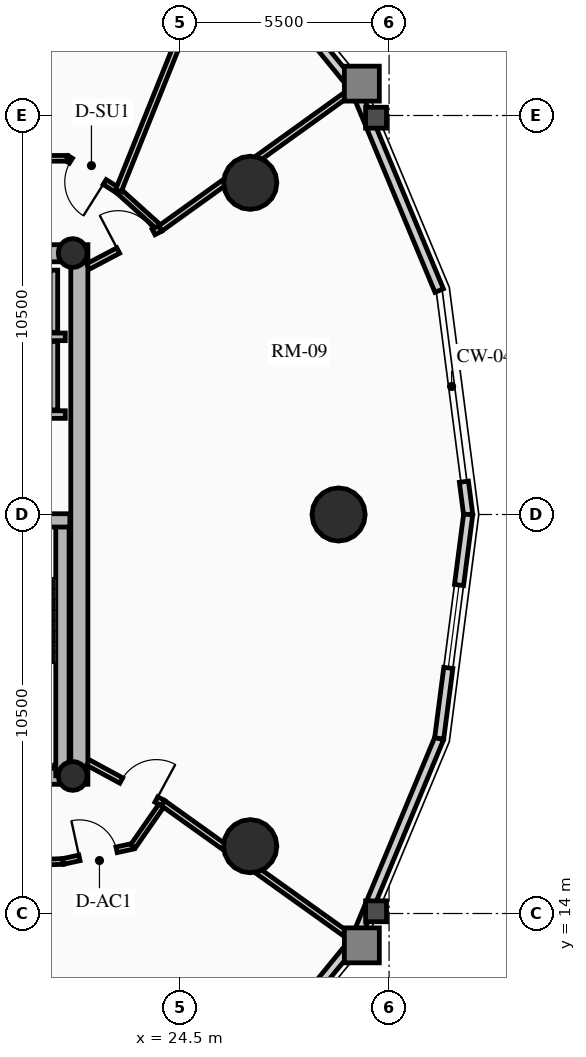
"""IFC4 building model, lengths in metres.
Left out: names, types, materials, properties, quantities, classifications, styles, units other than length and angle.
Written with IfcOpenShell. Run it as: python <this file> out.ifc"""

import sys

from ifc_helpers import new_model, si_unit, direction, frame, frame_2d, origin, origin_2d, place, context, subcontext, project, spatial, rectangle, circle, hollow_circle, extrude, source, transform, mapped, element, fill, save


model = new_model("IFC4")
c1 = context("Model", 3, precision=1e-05, world=origin(), true_north=direction((0.0, 1.0)))
c2 = subcontext(c1, "Body", "Model", "MODEL_VIEW")
j1 = project(units=[si_unit("LENGTHUNIT", "METRE"), si_unit("PLANEANGLEUNIT", "RADIAN")], contexts=[c1])
p1 = place(None, origin())
s1 = spatial("IfcSite", under=j1, at=p1, CompositionType="ELEMENT")
p2 = place(p1, origin())
s2 = spatial("IfcBuilding", under=s1, at=p2, CompositionType="ELEMENT")
p3 = place(p2, frame((0.0, 0.0, 119.62)))
s3 = spatial("IfcBuildingStorey", under=s2, at=p3, CompositionType="ELEMENT", Elevation=119.62)
p4 = place(p3, frame((21.85, 17.4, 0.0), z_axis=(0.0, 0.0, 1.0), x_axis=(0.0, 1.0, 0.0)))
e1 = element("IfcWall", 1, at=p4, inside=s3, PredefinedType="SHEAR", context=c2, shape_type="SweptSolid", body=[
    extrude(rectangle(XDim=14.2, YDim=0.45, at=frame_2d((7.1, 0.0))), origin(), (0.0, 0.0, 1.0), 2.91),
])
p5 = place(p3, frame((11.15, 17.625, 0.0), z_axis=(0.0, 0.0, 1.0), x_axis=(1.0, 0.0, 0.0)))
e2 = element("IfcWall", 2, at=p5, inside=s3, PredefinedType="SHEAR", context=c2, shape_type="SweptSolid", body=[
    extrude(rectangle(XDim=10.7, YDim=0.45, at=frame_2d((5.35, 0.0))), origin(), (0.0, 0.0, 1.0), 2.91),
])
m1 = source(origin(), c2, "Body", "SweptSolid", [
    extrude(rectangle(XDim=1.5, YDim=2.02, at=frame_2d((0.75, 1.01))), frame((0.0, 0.235, 0.0), z_axis=(0.0, -1.0, 0.0), x_axis=(1.0, 0.0, 0.0)), (0.0, 0.0, 1.0), 0.47),
])
p6 = place(p5, frame((5.45, 0.0, 0.0)))
e3 = element("IfcOpeningElement", 3, at=p6, cuts=e2, PredefinedType="OPENING", context=c2, shape_type="MappedRepresentation", body=[
    mapped(m1, transform((0.0, 0.0, 0.0), x_axis=(1.0, 0.0, 0.0), y_axis=(0.0, 1.0, 0.0), z_axis=(0.0, 0.0, 1.0), scale=1.0)),
])
p7 = place(p3, frame((11.15, 31.375, 0.0), z_axis=(0.0, 0.0, 1.0), x_axis=(1.0, 0.0, 0.0)))
e4 = element("IfcWall", 4, at=p7, inside=s3, PredefinedType="SHEAR", context=c2, shape_type="SweptSolid", body=[
    extrude(rectangle(XDim=10.7, YDim=0.45, at=frame_2d((5.35, 0.0))), origin(), (0.0, 0.0, 1.0), 2.91),
])
p8 = place(p7, frame((4.6, 0.0, 0.0)))
e5 = element("IfcOpeningElement", 5, at=p8, cuts=e4, PredefinedType="OPENING", context=c2, shape_type="MappedRepresentation", body=[
    mapped(m1, transform((0.0, 0.0, 0.0), x_axis=(1.0, 0.0, 0.0), y_axis=(0.0, 1.0, 0.0), z_axis=(0.0, 0.0, 1.0), scale=1.0)),
])
p9 = place(p3, frame((21.405, 17.625, 0.0), z_axis=(0.0, 0.0, 1.0), x_axis=(0.0, 1.0, 0.0)))
e6 = element("IfcWall", 6, at=p9, inside=s3, PredefinedType="SHEAR", context=c2, shape_type="SweptSolid", body=[
    extrude(rectangle(XDim=6.72, YDim=0.35, at=frame_2d((3.36, 0.0))), origin(), (0.0, 0.0, 1.0), 2.91),
])
p10 = place(p3, frame((18.315, 24.345, 0.0), z_axis=(0.0, 0.0, 1.0), x_axis=(1.0, 0.0, 0.0)))
e7 = element("IfcWall", 7, at=p10, inside=s3, PredefinedType="SHEAR", context=c2, shape_type="SweptSolid", body=[
    extrude(rectangle(XDim=3.285, YDim=0.35, at=frame_2d((1.643, 0.0))), origin(), (0.0, 0.0, 1.0), 2.91),
])
for number, where, z_axis, x_axis in (
    (8, (21.675, 17.62, 0.0), (0.0, 0.0, 1.0), (1.0, 0.0, 0.0)),
    (9, (21.675, 31.38, 0.0), (0.0, 0.0, 1.0), (1.0, 0.0, 0.0)),
):
    element("IfcColumn", number, at=place(p3, frame(where, z_axis=z_axis, x_axis=x_axis)), inside=s3, PredefinedType="COLUMN", context=c2, shape_type="SweptSolid", body=[
        extrude(hollow_circle(Radius=0.38, WallThickness=0.032, at=origin_2d()), origin(), (0.0, 0.0, 1.0), 2.91),
    ])
for number, where, z_axis, x_axis in (
    (10, (28.672, 24.5, 0.0), (0.0, 0.0, 1.0), (1.0, 0.0, 0.0)),
    (11, (26.347, 33.229, 0.0), (0.0, 0.0, 1.0), (1.0, 0.0, 0.0)),
    (12, (26.347, 15.771, 0.0), (0.0, 0.0, 1.0), (1.0, 0.0, 0.0)),
):
    element("IfcColumn", number, at=place(p3, frame(where, z_axis=z_axis, x_axis=x_axis)), inside=s3, PredefinedType="USERDEFINED", context=c2, shape_type="SweptSolid", body=[
        extrude(circle(Radius=0.7, at=origin_2d()), origin(), (0.0, 0.0, 1.0), 2.91),
    ])
p11 = place(p3, frame((31.969, 25.363, 0.0), z_axis=(0.0, 0.0, 1.0), x_axis=(0.128523364007, -0.991706481225, 0.0)))
e13 = element("IfcWall", 13, at=p11, inside=s3, PredefinedType="SOLIDWALL", context=c2, shape_type="SweptSolid", body=[
    extrude(rectangle(XDim=0.87, YDim=0.24, at=frame_2d((0.435, 0.0))), origin(), (0.0, 0.0, 1.0), 2.655),
])
p12 = place(p3, frame((29.105, 35.709, 0.0), z_axis=(0.0, 0.0, 1.0), x_axis=(0.384344417632, -0.923189779317, 0.0)))
e14 = element("IfcWall", 14, at=p12, inside=s3, PredefinedType="SOLIDWALL", context=c2, shape_type="SweptSolid", body=[
    extrude(rectangle(XDim=5.758, YDim=0.24, at=frame_2d((2.879, 0.0))), origin(), (0.0, 0.0, 1.0), 2.179),
])
p13 = place(p3, frame((25.658, 39.928, 0.0), z_axis=(0.0, 0.0, 1.0), x_axis=(0.632700781152, -0.77439635945, 0.0)))
e15 = element("IfcWall", 15, at=p13, inside=s3, PredefinedType="SOLIDWALL", context=c2, shape_type="SweptSolid", body=[
    extrude(rectangle(XDim=5.448, YDim=0.24, at=frame_2d((2.724, 0.0))), origin(), (0.0, 0.0, 1.0), 2.179),
])
m2 = source(origin(), c2, "Body", "SweptSolid", [
    extrude(rectangle(XDim=1.9, YDim=1.35, at=frame_2d((0.95, 0.675))), frame((0.0, 0.13, 0.0), z_axis=(0.0, -1.0, 0.0), x_axis=(1.0, 0.0, 0.0)), (0.0, 0.0, 1.0), 0.26),
])
p14 = place(p13, frame((1.774, 0.0, 0.65)))
e16 = element("IfcOpeningElement", 16, at=p14, cuts=e15, PredefinedType="OPENING", context=c2, shape_type="MappedRepresentation", body=[
    mapped(m2, transform((0.0, 0.0, 0.0), x_axis=(1.0, 0.0, 0.0), y_axis=(0.0, 1.0, 0.0), z_axis=(0.0, 0.0, 1.0), scale=1.0)),
])
p15 = place(p3, frame((29.105, 13.291, 0.0), z_axis=(0.0, 0.0, 1.0), x_axis=(-0.632700781152, -0.77439635945, 0.0)))
e17 = element("IfcWall", 17, at=p15, inside=s3, PredefinedType="SOLIDWALL", context=c2, shape_type="SweptSolid", body=[
    extrude(rectangle(XDim=5.448, YDim=0.24, at=frame_2d((2.724, 0.0))), origin(), (0.0, 0.0, 1.0), 2.179),
])
p16 = place(p15, frame((1.774, 0.0, 0.65)))
e18 = element("IfcOpeningElement", 18, at=p16, cuts=e17, PredefinedType="OPENING", context=c2, shape_type="MappedRepresentation", body=[
    mapped(m2, transform((0.0, 0.0, 0.0), x_axis=(1.0, 0.0, 0.0), y_axis=(0.0, 1.0, 0.0), z_axis=(0.0, 0.0, 1.0), scale=1.0)),
])
p17 = place(p3, frame((31.318, 18.607, 0.0), z_axis=(0.0, 0.0, 1.0), x_axis=(-0.384344417632, -0.923189779317, 0.0)))
e19 = element("IfcWall", 19, at=p17, inside=s3, PredefinedType="SOLIDWALL", context=c2, shape_type="SweptSolid", body=[
    extrude(rectangle(XDim=5.758, YDim=0.24, at=frame_2d((2.879, 0.0))), origin(), (0.0, 0.0, 1.0), 2.179),
])
p18 = place(p3, frame((32.081, 24.5, 0.0), z_axis=(0.0, 0.0, 1.0), x_axis=(-0.128351991996, -0.991728675672, 0.0)))
e20 = element("IfcWall", 20, at=p18, inside=s3, PredefinedType="SOLIDWALL", context=c2, shape_type="SweptSolid", body=[
    extrude(rectangle(XDim=5.942, YDim=0.24, at=frame_2d((2.971, 0.0))), origin(), (0.0, 0.0, 1.0), 2.179),
])
m3 = source(origin(), c2, "Body", "SweptSolid", [
    extrude(rectangle(XDim=2.2, YDim=1.35, at=frame_2d((1.1, 0.675))), frame((0.0, 0.13, 0.0), z_axis=(0.0, -1.0, 0.0), x_axis=(1.0, 0.0, 0.0)), (0.0, 0.0, 1.0), 0.26),
])
p19 = place(p18, frame((1.871, 0.0, 0.65)))
e21 = element("IfcOpeningElement", 21, at=p19, cuts=e20, PredefinedType="OPENING", context=c2, shape_type="MappedRepresentation", body=[
    mapped(m3, transform((0.0, 0.0, 0.0), x_axis=(1.0, 0.0, 0.0), y_axis=(0.0, 1.0, 0.0), z_axis=(0.0, 0.0, 1.0), scale=1.0)),
])
for number, where, z_axis, x_axis in (
    (22, (18.51, 27.13, 0.0), (0.0, 0.0, 1.0), (1.0, 0.0, 0.0)),
    (23, (18.51, 29.175, 0.0), (0.0, 0.0, 1.0), (1.0, 0.0, 0.0)),
):
    element("IfcWall", number, at=place(p3, frame(where, z_axis=z_axis, x_axis=x_axis)), inside=s3, PredefinedType="SHEAR", context=c2, shape_type="SweptSolid", body=[
        extrude(rectangle(XDim=2.97, YDim=0.2, at=frame_2d((1.485, 0.0))), origin(), (0.0, 0.0, 1.0), 2.91),
    ])
p20 = place(p3, frame((21.18, 27.25, 0.0), z_axis=(0.0, 0.0, 1.0), x_axis=(0.0, 1.0, 0.0)))
e24 = element("IfcWall", 24, at=p20, inside=s3, PredefinedType="SHEAR", context=c2, shape_type="SweptSolid", body=[
    extrude(rectangle(XDim=1.805, YDim=0.2, at=frame_2d((0.902, 0.0))), origin(), (0.0, 0.0, 1.0), 2.91),
])
p21 = place(p3, frame((21.18, 29.295, 0.0), z_axis=(0.0, 0.0, 1.0), x_axis=(0.0, 1.0, 0.0)))
e25 = element("IfcWall", 25, at=p21, inside=s3, PredefinedType="SHEAR", context=c2, shape_type="SweptSolid", body=[
    extrude(rectangle(XDim=1.635, YDim=0.2, at=frame_2d((0.817, 0.0))), origin(), (0.0, 0.0, 1.0), 2.91),
])
p22 = place(p3, frame((23.98, 32.027, 0.0), z_axis=(0.0, 0.0, 1.0), x_axis=(-0.742353224332, 0.670008724065, 0.0)))
e26 = element("IfcWall", 26, at=p22, inside=s3, PredefinedType="PARTITIONING", context=c2, shape_type="SweptSolid", body=[
    extrude(rectangle(XDim=1.485, YDim=0.15, at=frame_2d((0.742, 0.0))), origin(), (0.0, 0.0, 1.0), 2.225),
])
p23 = place(p3, frame((22.877, 33.022, 0.0), z_axis=(0.0, 0.0, 1.0), x_axis=(-0.845895608855, 0.533348496689, 0.0)))
e27 = element("IfcWall", 27, at=p23, inside=s3, PredefinedType="PARTITIONING", context=c2, shape_type="SweptSolid", body=[
    extrude(rectangle(XDim=1.597, YDim=0.15, at=frame_2d((0.798, 0.0))), origin(), (0.0, 0.0, 1.0), 2.225),
])
m4 = source(origin(), c2, "Body", "SweptSolid", [
    extrude(rectangle(XDim=1.05, YDim=2.015, at=frame_2d((0.525, 1.007))), frame((0.0, 0.085, 0.0), z_axis=(0.0, -1.0, 0.0), x_axis=(1.0, 0.0, 0.0)), (0.0, 0.0, 1.0), 0.17),
])
p24 = place(p23, frame((0.427, 0.0, 0.0)))
e28 = element("IfcOpeningElement", 28, at=p24, cuts=e27, PredefinedType="OPENING", context=c2, shape_type="MappedRepresentation", body=[
    mapped(m4, transform((0.0, 0.0, 0.0), x_axis=(1.0, 0.0, 0.0), y_axis=(0.0, 1.0, 0.0), z_axis=(0.0, 0.0, 1.0), scale=1.0)),
])
p25 = place(p3, frame((21.527, 33.873, 0.0), z_axis=(0.0, 0.0, 1.0), x_axis=(-0.999991838845, -0.004040079574, 0.0)))
e29 = element("IfcWall", 29, at=p25, inside=s3, PredefinedType="PARTITIONING", context=c2, shape_type="SweptSolid", body=[
    extrude(rectangle(XDim=3.384, YDim=0.15, at=frame_2d((1.692, 0.0))), origin(), (0.0, 0.0, 1.0), 2.225),
])
p26 = place(p3, frame((14.781, 15.141, 0.0), z_axis=(0.0, 0.0, 1.0), x_axis=(0.999407918707, 0.034406569513, 0.0)))
e30 = element("IfcWall", 30, at=p26, inside=s3, PredefinedType="PARTITIONING", context=c2, shape_type="SweptSolid", body=[
    extrude(rectangle(XDim=6.642, YDim=0.15, at=frame_2d((3.321, 0.0))), origin(), (0.0, 0.0, 1.0), 2.225),
])
p27 = place(p3, frame((21.419, 15.369, 0.0), z_axis=(0.0, 0.0, 1.0), x_axis=(0.977192701953, 0.212354475464, 0.0)))
e31 = element("IfcWall", 31, at=p27, inside=s3, PredefinedType="PARTITIONING", context=c2, shape_type="SweptSolid", body=[
    extrude(rectangle(XDim=1.888, YDim=0.15, at=frame_2d((0.944, 0.0))), origin(), (0.0, 0.0, 1.0), 2.225),
])
m5 = source(origin(), c2, "Body", "SweptSolid", [
    extrude(rectangle(XDim=1.0, YDim=2.015, at=frame_2d((0.5, 1.007))), frame((0.0, 0.085, 0.0), z_axis=(0.0, -1.0, 0.0), x_axis=(1.0, 0.0, 0.0)), (0.0, 0.0, 1.0), 0.17),
])
p28 = place(p27, frame((0.444, 0.0, 0.0)))
e32 = element("IfcOpeningElement", 32, at=p28, cuts=e31, PredefinedType="OPENING", context=c2, shape_type="MappedRepresentation", body=[
    mapped(m5, transform((0.0, 0.0, 0.0), x_axis=(1.0, 0.0, 0.0), y_axis=(0.0, 1.0, 0.0), z_axis=(0.0, 0.0, 1.0), scale=1.0)),
])
p29 = place(p3, frame((23.263, 15.77, 0.0), z_axis=(0.0, 0.0, 1.0), x_axis=(0.570743456919, 0.821128434768, 0.0)))
e33 = element("IfcWall", 33, at=p29, inside=s3, PredefinedType="PARTITIONING", context=c2, shape_type="SweptSolid", body=[
    extrude(rectangle(XDim=1.382, YDim=0.15, at=frame_2d((0.691, 0.0))), origin(), (0.0, 0.0, 1.0), 2.225),
])
p30 = place(p3, frame((23.98, 32.027, 0.0), z_axis=(0.0, 0.0, 1.0), x_axis=(0.812162479031, 0.58343132214, 0.0)))
e34 = element("IfcWall", 34, at=p30, inside=s3, PredefinedType="PARTITIONING", context=c2, shape_type="SweptSolid", body=[
    extrude(rectangle(XDim=6.291, YDim=0.16, at=frame_2d((3.146, 0.0))), origin(), (0.0, 0.0, 1.0), 2.179),
])
p31 = place(p3, frame((22.877, 33.022, 0.0), z_axis=(0.0, 0.0, 1.0), x_axis=(0.372898022516, 0.927872332168, 0.0)))
e35 = element("IfcWall", 35, at=p31, inside=s3, PredefinedType="PARTITIONING", context=c2, shape_type="SweptSolid", body=[
    extrude(rectangle(XDim=7.426, YDim=0.16, at=frame_2d((3.713, 0.0))), origin(), (0.0, 0.0, 1.0), 2.179),
])
p32 = place(p3, frame((24.052, 16.905, 0.0), z_axis=(0.0, 0.0, 1.0), x_axis=(0.813437670746, -0.581652091727, 0.0)))
e36 = element("IfcWall", 36, at=p32, inside=s3, PredefinedType="PARTITIONING", context=c2, shape_type="SweptSolid", body=[
    extrude(rectangle(XDim=6.192, YDim=0.16, at=frame_2d((3.096, 0.0))), origin(), (0.0, 0.0, 1.0), 2.179),
])
p33 = place(p3, frame((22.075, 31.025, 0.0), z_axis=(0.0, 0.0, 1.0), x_axis=(0.885026466958, 0.465540710125, 0.0)))
e37 = element("IfcWall", 37, at=p33, inside=s3, PredefinedType="PARTITIONING", context=c2, shape_type="SweptSolid", body=[
    extrude(rectangle(XDim=2.152, YDim=0.16, at=frame_2d((1.076, 0.0))), origin(), (0.0, 0.0, 1.0), 2.225),
])
m6 = source(origin(), c2, "Body", "SweptSolid", [
    extrude(rectangle(XDim=1.05, YDim=2.015, at=frame_2d((0.525, 1.007))), frame((0.0, 0.09, 0.0), z_axis=(0.0, -1.0, 0.0), x_axis=(1.0, 0.0, 0.0)), (0.0, 0.0, 1.0), 0.18),
])
p34 = place(p33, frame((0.902, 0.0, 0.0)))
e38 = element("IfcOpeningElement", 38, at=p34, cuts=e37, PredefinedType="OPENING", context=c2, shape_type="MappedRepresentation", body=[
    mapped(m6, transform((0.0, 0.0, 0.0), x_axis=(1.0, 0.0, 0.0), y_axis=(0.0, 1.0, 0.0), z_axis=(0.0, 0.0, 1.0), scale=1.0)),
])
p35 = place(p3, frame((22.075, 17.975, 0.0), z_axis=(0.0, 0.0, 1.0), x_axis=(0.879356383302, -0.476164206073, 0.0)))
e39 = element("IfcWall", 39, at=p35, inside=s3, PredefinedType="PARTITIONING", context=c2, shape_type="SweptSolid", body=[
    extrude(rectangle(XDim=2.248, YDim=0.16, at=frame_2d((1.124, 0.0))), origin(), (0.0, 0.0, 1.0), 2.225),
])
p36 = place(p35, frame((0.998, 0.0, 0.0)))
e40 = element("IfcOpeningElement", 40, at=p36, cuts=e39, PredefinedType="OPENING", context=c2, shape_type="MappedRepresentation", body=[
    mapped(m6, transform((0.0, 0.0, 0.0), x_axis=(1.0, 0.0, 0.0), y_axis=(0.0, 1.0, 0.0), z_axis=(0.0, 0.0, 1.0), scale=1.0)),
])
m7 = source(origin(), c2, "Body", "SweptSolid", [
    extrude(rectangle(XDim=2.2, YDim=1.35, at=frame_2d((1.1, 0.675))), frame((0.0, 0.03, 0.0), z_axis=(0.0, -1.0, 0.0), x_axis=(1.0, 0.0, 0.0)), (0.0, 0.0, 1.0), 0.06),
])
p37 = place(p19, origin())
e41 = element("IfcWindow", 41, at=p37, inside=s3, PartitioningType="DOUBLE_PANEL_VERTICAL", PredefinedType="WINDOW", context=c2, shape_type="MappedRepresentation", body=[
    mapped(m7, transform((0.0, 0.0, 0.0), x_axis=(1.0, 0.0, 0.0), y_axis=(0.0, 1.0, 0.0), z_axis=(0.0, 0.0, 1.0), scale=1.0)),
])
fill(e21, e41)
m8 = source(origin(), c2, "Body", "SweptSolid", [
    extrude(rectangle(XDim=1.05, YDim=2.015, at=frame_2d((0.525, 1.007))), frame((0.0, 0.025, 0.0), z_axis=(0.0, -1.0, 0.0), x_axis=(1.0, 0.0, 0.0)), (0.0, 0.0, 1.0), 0.05),
])
p38 = place(p34, origin())
e42 = element("IfcDoor", 42, at=p38, inside=s3, OperationType="SINGLE_SWING_LEFT", PredefinedType="DOOR", context=c2, shape_type="MappedRepresentation", body=[
    mapped(m8, transform((0.0, 0.0, 0.0), x_axis=(1.0, 0.0, 0.0), y_axis=(0.0, 1.0, 0.0), z_axis=(0.0, 0.0, 1.0), scale=1.0)),
])
fill(e38, e42)
p39 = place(p36, origin())
e43 = element("IfcDoor", 43, at=p39, inside=s3, OperationType="SINGLE_SWING_RIGHT", PredefinedType="DOOR", context=c2, shape_type="MappedRepresentation", body=[
    mapped(m8, transform((0.0, 0.0, 0.0), x_axis=(1.0, 0.0, 0.0), y_axis=(0.0, 1.0, 0.0), z_axis=(0.0, 0.0, 1.0), scale=1.0)),
])
fill(e40, e43)
p40 = place(p24, origin())
e44 = element("IfcDoor", 44, at=p40, inside=s3, OperationType="SINGLE_SWING_LEFT", PredefinedType="DOOR", context=c2, shape_type="MappedRepresentation", body=[
    mapped(m8, transform((0.0, 0.0, 0.0), x_axis=(1.0, 0.0, 0.0), y_axis=(0.0, 1.0, 0.0), z_axis=(0.0, 0.0, 1.0), scale=1.0)),
])
fill(e28, e44)
m9 = source(origin(), c2, "Body", "SweptSolid", [
    extrude(rectangle(XDim=1.0, YDim=2.015, at=frame_2d((0.5, 1.007))), frame((0.0, 0.025, 0.0), z_axis=(0.0, -1.0, 0.0), x_axis=(1.0, 0.0, 0.0)), (0.0, 0.0, 1.0), 0.05),
])
p41 = place(p28, origin())
e45 = element("IfcDoor", 45, at=p41, inside=s3, OperationType="SINGLE_SWING_LEFT", PredefinedType="DOOR", context=c2, shape_type="MappedRepresentation", body=[
    mapped(m9, transform((0.0, 0.0, 0.0), x_axis=(1.0, 0.0, 0.0), y_axis=(0.0, 1.0, 0.0), z_axis=(0.0, 0.0, 1.0), scale=1.0)),
])
fill(e32, e45)
save(model, sys.argv[1])
